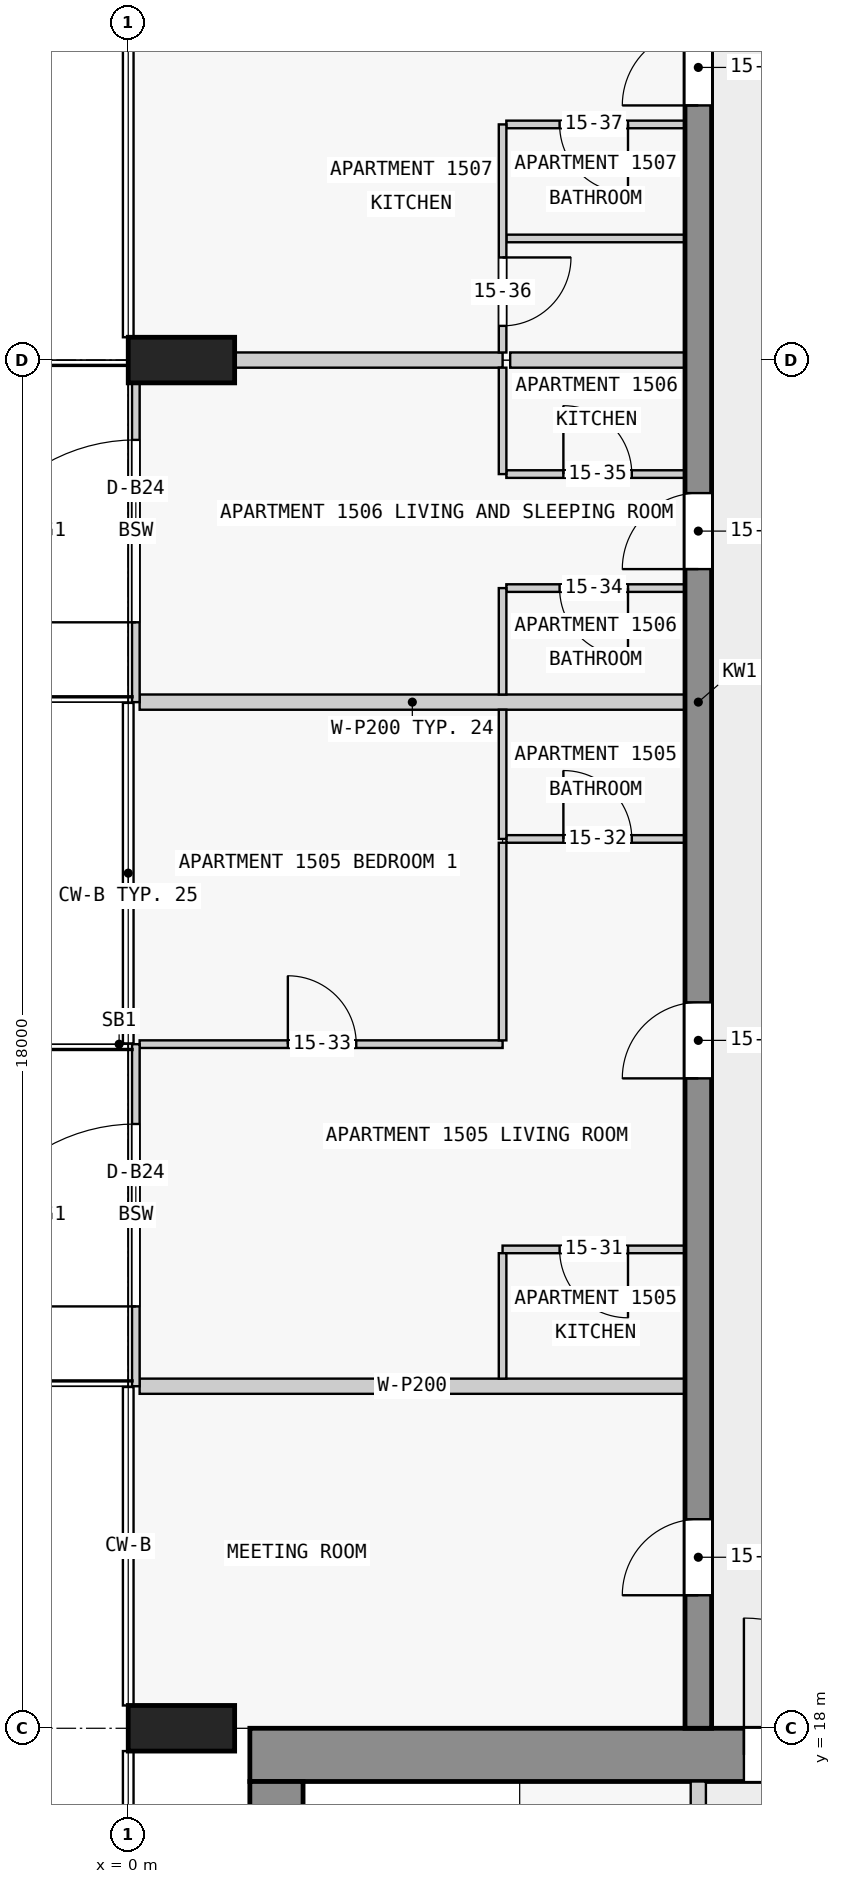
"""IFC4 building model, lengths in metres.
Left out: names, types, materials, properties, quantities, classifications, styles, units other than length and angle.
Written with IfcOpenShell. Run it as: python <this file> out.ifc"""

import sys

from ifc_helpers import new_model, si_unit, direction, frame, frame_2d, origin, origin_2d, place, context, subcontext, project, spatial, rectangle, extrude, element, fill, save


model = new_model("IFC4")
c1 = context("Model", 3, precision=1e-05, world=origin(), true_north=direction((0.0, 1.0)))
c2 = subcontext(c1, "Body", "Model", "MODEL_VIEW")
j1 = project(units=[si_unit("LENGTHUNIT", "METRE"), si_unit("PLANEANGLEUNIT", "RADIAN")], contexts=[c1])
p1 = place(None, origin())
s1 = spatial("IfcSite", under=j1, at=p1, CompositionType="ELEMENT")
p2 = place(p1, origin())
s2 = spatial("IfcBuilding", under=s1, at=p2, CompositionType="ELEMENT")
p3 = place(p2, frame((0.0, 0.0, 61.8)))
s3 = spatial("IfcBuildingStorey", under=s2, at=p3, CompositionType="ELEMENT", Elevation=61.8)
for number, where, z_axis, x_axis in (
    (1, (0.7, 36.0, 0.0), (0.0, 0.0, 1.0), (0.0, 1.0, 0.0)),
    (2, (0.7, 18.0, 0.0), (0.0, 0.0, 1.0), (0.0, 1.0, 0.0)),
):
    element("IfcColumn", number, at=place(p3, frame(where, z_axis=z_axis, x_axis=x_axis)), inside=s3, PredefinedType="COLUMN", context=c2, shape_type="SweptSolid", body=[
        extrude(rectangle(XDim=0.6, YDim=1.4, at=origin_2d()), origin(), (0.0, 0.0, 1.0), 3.5),
    ])
p4 = place(p3, frame((1.6, 17.65, 0.0), z_axis=(0.0, 0.0, 1.0), x_axis=(1.0, 0.0, 0.0)))
e3 = element("IfcWall", 3, at=p4, inside=s3, PredefinedType="SHEAR", context=c2, shape_type="SweptSolid", body=[
    extrude(rectangle(XDim=20.9, YDim=0.7, at=frame_2d((10.45, 0.0))), origin(), (0.0, 0.0, 1.0), 3.25),
])
p5 = place(p4, frame((6.5, 0.0, 0.0)))
e4 = element("IfcOpeningElement", 4, at=p5, cuts=e3, PredefinedType="OPENING", context=c2, shape_type="SweptSolid", body=[
    extrude(rectangle(XDim=1.8, YDim=2.1, at=frame_2d((0.9, 1.05))), frame((0.0, 0.36, 0.0), z_axis=(0.0, -1.0, 0.0), x_axis=(1.0, 0.0, 0.0)), (0.0, 0.0, 1.0), 0.72),
])
p6 = place(p3, frame((1.95, 2.5, 0.0), z_axis=(0.0, 0.0, 1.0), x_axis=(0.0, 1.0, 0.0)))
e5 = element("IfcWall", 5, at=p6, inside=s3, PredefinedType="SHEAR", context=c2, shape_type="SweptSolid", body=[
    extrude(rectangle(XDim=14.8, YDim=0.7, at=frame_2d((7.4, 0.0))), origin(), (0.0, 0.0, 1.0), 3.25),
])
p7 = place(p3, frame((7.5, 18.0, 0.0), z_axis=(0.0, 0.0, 1.0), x_axis=(0.0, 1.0, 0.0)))
e6 = element("IfcWall", 6, at=p7, inside=s3, PredefinedType="SHEAR", context=c2, shape_type="SweptSolid", body=[
    extrude(rectangle(XDim=27.0, YDim=0.35, at=frame_2d((13.5, 0.0))), origin(), (0.0, 0.0, 1.0), 3.25),
])
p8 = place(p7, frame((1.75, 0.0, 0.0)))
e7 = element("IfcOpeningElement", 7, at=p8, cuts=e6, PredefinedType="OPENING", context=c2, shape_type="SweptSolid", body=[
    extrude(rectangle(XDim=1.0, YDim=2.1, at=frame_2d((0.5, 1.05))), frame((0.0, 0.185, 0.0), z_axis=(0.0, -1.0, 0.0), x_axis=(1.0, 0.0, 0.0)), (0.0, 0.0, 1.0), 0.37),
])
p9 = place(p7, frame((8.55, 0.0, 0.0)))
e8 = element("IfcOpeningElement", 8, at=p9, cuts=e6, PredefinedType="OPENING", context=c2, shape_type="SweptSolid", body=[
    extrude(rectangle(XDim=1.0, YDim=2.1, at=frame_2d((0.5, 1.05))), frame((0.0, 0.185, 0.0), z_axis=(0.0, -1.0, 0.0), x_axis=(1.0, 0.0, 0.0)), (0.0, 0.0, 1.0), 0.37),
])
p10 = place(p7, frame((15.25, 0.0, 0.0)))
e9 = element("IfcOpeningElement", 9, at=p10, cuts=e6, PredefinedType="OPENING", context=c2, shape_type="SweptSolid", body=[
    extrude(rectangle(XDim=1.0, YDim=2.1, at=frame_2d((0.5, 1.05))), frame((0.0, 0.185, 0.0), z_axis=(0.0, -1.0, 0.0), x_axis=(1.0, 0.0, 0.0)), (0.0, 0.0, 1.0), 0.37),
])
p11 = place(p7, frame((21.35, 0.0, 0.0)))
e10 = element("IfcOpeningElement", 10, at=p11, cuts=e6, PredefinedType="OPENING", context=c2, shape_type="SweptSolid", body=[
    extrude(rectangle(XDim=1.0, YDim=2.1, at=frame_2d((0.5, 1.05))), frame((0.0, 0.185, 0.0), z_axis=(0.0, -1.0, 0.0), x_axis=(1.0, 0.0, 0.0)), (0.0, 0.0, 1.0), 0.37),
])
p12 = place(p3, frame((0.1, 22.5, 0.0), z_axis=(0.0, 0.0, 1.0), x_axis=(0.0, 1.0, 0.0)))
e11 = element("IfcWall", 11, at=p12, inside=s3, PredefinedType="STANDARD", context=c2, shape_type="SweptSolid", body=[
    extrude(rectangle(XDim=4.5, YDim=0.1, at=frame_2d((2.25, 0.0))), origin(), (0.0, 0.0, 1.0), 3.25),
])
p13 = place(p12, frame((1.05, 0.0, 0.0)))
e12 = element("IfcOpeningElement", 12, at=p13, cuts=e11, PredefinedType="OPENING", context=c2, shape_type="SweptSolid", body=[
    extrude(rectangle(XDim=2.4, YDim=2.4, at=frame_2d((1.2, 1.2))), frame((0.0, 0.06, 0.0), z_axis=(0.0, -1.0, 0.0), x_axis=(1.0, 0.0, 0.0)), (0.0, 0.0, 1.0), 0.12),
])
p14 = place(p3, frame((0.1, 31.5, 0.0), z_axis=(0.0, 0.0, 1.0), x_axis=(0.0, 1.0, 0.0)))
e13 = element("IfcWall", 13, at=p14, inside=s3, PredefinedType="STANDARD", context=c2, shape_type="SweptSolid", body=[
    extrude(rectangle(XDim=4.5, YDim=0.1, at=frame_2d((2.25, 0.0))), origin(), (0.0, 0.0, 1.0), 3.25),
])
p15 = place(p14, frame((1.05, 0.0, 0.0)))
e14 = element("IfcOpeningElement", 14, at=p15, cuts=e13, PredefinedType="OPENING", context=c2, shape_type="SweptSolid", body=[
    extrude(rectangle(XDim=2.4, YDim=2.4, at=frame_2d((1.2, 1.2))), frame((0.0, 0.06, 0.0), z_axis=(0.0, -1.0, 0.0), x_axis=(1.0, 0.0, 0.0)), (0.0, 0.0, 1.0), 0.12),
])
p16 = place(p3, frame((7.5, 10.1, 0.0), z_axis=(0.0, 0.0, 1.0), x_axis=(0.0, 1.0, 0.0)))
e15 = element("IfcWall", 15, at=p16, inside=s3, PredefinedType="PARTITIONING", context=c2, shape_type="SweptSolid", body=[
    extrude(rectangle(XDim=7.2, YDim=0.2, at=frame_2d((3.6, 0.0))), origin(), (0.0, 0.0, 1.0), 3.25),
])
p17 = place(p16, frame((0.8, 0.0, 0.0)))
e16 = element("IfcOpeningElement", 16, at=p17, cuts=e15, PredefinedType="OPENING", context=c2, shape_type="SweptSolid", body=[
    extrude(rectangle(XDim=0.9, YDim=2.1, at=frame_2d((0.45, 1.05))), frame((0.0, 0.11, 0.0), z_axis=(0.0, -1.0, 0.0), x_axis=(1.0, 0.0, 0.0)), (0.0, 0.0, 1.0), 0.22),
])
p18 = place(p16, frame((3.3, 0.0, 0.0)))
e17 = element("IfcOpeningElement", 17, at=p18, cuts=e15, PredefinedType="OPENING", context=c2, shape_type="SweptSolid", body=[
    extrude(rectangle(XDim=0.9, YDim=2.1, at=frame_2d((0.45, 1.05))), frame((0.0, 0.11, 0.0), z_axis=(0.0, -1.0, 0.0), x_axis=(1.0, 0.0, 0.0)), (0.0, 0.0, 1.0), 0.22),
])
p19 = place(p16, frame((5.25, 0.0, 0.0)))
e18 = element("IfcOpeningElement", 18, at=p19, cuts=e15, PredefinedType="OPENING", context=c2, shape_type="SweptSolid", body=[
    extrude(rectangle(XDim=0.9, YDim=2.1, at=frame_2d((0.45, 1.05))), frame((0.0, 0.11, 0.0), z_axis=(0.0, -1.0, 0.0), x_axis=(1.0, 0.0, 0.0)), (0.0, 0.0, 1.0), 0.22),
])
p20 = place(p3, frame((7.325, 22.5, 0.0), z_axis=(0.0, 0.0, 1.0), x_axis=(-1.0, 0.0, 0.0)))
e19 = element("IfcWall", 19, at=p20, inside=s3, PredefinedType="PARTITIONING", context=c2, shape_type="SweptSolid", body=[
    extrude(rectangle(XDim=7.175, YDim=0.2, at=frame_2d((3.587, 0.0))), origin(), (0.0, 0.0, 1.0), 3.25),
])
p21 = place(p3, frame((7.325, 24.3, 0.0), z_axis=(0.0, 0.0, 1.0), x_axis=(-1.0, 0.0, 0.0)))
e20 = element("IfcWall", 20, at=p21, inside=s3, PredefinedType="PARTITIONING", context=c2, shape_type="SweptSolid", body=[
    extrude(rectangle(XDim=2.4, YDim=0.1, at=frame_2d((1.2, 0.0))), origin(), (0.0, 0.0, 1.0), 3.25),
])
p22 = place(p21, frame((0.75, 0.0, 0.0)))
e21 = element("IfcOpeningElement", 21, at=p22, cuts=e20, PredefinedType="OPENING", context=c2, shape_type="SweptSolid", body=[
    extrude(rectangle(XDim=0.9, YDim=2.1, at=frame_2d((0.45, 1.05))), frame((0.0, 0.06, 0.0), z_axis=(0.0, -1.0, 0.0), x_axis=(1.0, 0.0, 0.0)), (0.0, 0.0, 1.0), 0.12),
])
p23 = place(p3, frame((0.15, 27.0, 0.0), z_axis=(0.0, 0.0, 1.0), x_axis=(1.0, 0.0, 0.0)))
e22 = element("IfcWall", 22, at=p23, inside=s3, PredefinedType="PARTITIONING", context=c2, shape_type="SweptSolid", body=[
    extrude(rectangle(XDim=4.775, YDim=0.1, at=frame_2d((2.388, 0.0))), origin(), (0.0, 0.0, 1.0), 3.25),
])
p24 = place(p23, frame((1.95, 0.0, 0.0)))
e23 = element("IfcOpeningElement", 23, at=p24, cuts=e22, PredefinedType="OPENING", context=c2, shape_type="SweptSolid", body=[
    extrude(rectangle(XDim=0.9, YDim=2.1, at=frame_2d((0.45, 1.05))), frame((0.0, 0.06, 0.0), z_axis=(0.0, -1.0, 0.0), x_axis=(1.0, 0.0, 0.0)), (0.0, 0.0, 1.0), 0.12),
])
p25 = place(p3, frame((4.975, 29.7, 0.0), z_axis=(0.0, 0.0, 1.0), x_axis=(1.0, 0.0, 0.0)))
e24 = element("IfcWall", 24, at=p25, inside=s3, PredefinedType="PARTITIONING", context=c2, shape_type="SweptSolid", body=[
    extrude(rectangle(XDim=2.35, YDim=0.1, at=frame_2d((1.175, 0.0))), origin(), (0.0, 0.0, 1.0), 3.25),
])
p26 = place(p25, frame((0.75, 0.0, 0.0)))
e25 = element("IfcOpeningElement", 25, at=p26, cuts=e24, PredefinedType="OPENING", context=c2, shape_type="SweptSolid", body=[
    extrude(rectangle(XDim=0.9, YDim=2.1, at=frame_2d((0.45, 1.05))), frame((0.0, 0.06, 0.0), z_axis=(0.0, -1.0, 0.0), x_axis=(1.0, 0.0, 0.0)), (0.0, 0.0, 1.0), 0.12),
])
p27 = place(p3, frame((7.325, 31.5, 0.0), z_axis=(0.0, 0.0, 1.0), x_axis=(-1.0, 0.0, 0.0)))
e26 = element("IfcWall", 26, at=p27, inside=s3, PredefinedType="PARTITIONING", context=c2, shape_type="SweptSolid", body=[
    extrude(rectangle(XDim=7.175, YDim=0.2, at=frame_2d((3.587, 0.0))), origin(), (0.0, 0.0, 1.0), 3.25),
])
p28 = place(p3, frame((7.325, 33.0, 0.0), z_axis=(0.0, 0.0, 1.0), x_axis=(-1.0, 0.0, 0.0)))
e27 = element("IfcWall", 27, at=p28, inside=s3, PredefinedType="PARTITIONING", context=c2, shape_type="SweptSolid", body=[
    extrude(rectangle(XDim=2.35, YDim=0.1, at=frame_2d((1.175, 0.0))), origin(), (0.0, 0.0, 1.0), 3.25),
])
p29 = place(p28, frame((0.75, 0.0, 0.0)))
e28 = element("IfcOpeningElement", 28, at=p29, cuts=e27, PredefinedType="OPENING", context=c2, shape_type="SweptSolid", body=[
    extrude(rectangle(XDim=0.9, YDim=2.1, at=frame_2d((0.45, 1.05))), frame((0.0, 0.06, 0.0), z_axis=(0.0, -1.0, 0.0), x_axis=(1.0, 0.0, 0.0)), (0.0, 0.0, 1.0), 0.12),
])
p30 = place(p3, frame((4.975, 34.5, 0.0), z_axis=(0.0, 0.0, 1.0), x_axis=(1.0, 0.0, 0.0)))
e29 = element("IfcWall", 29, at=p30, inside=s3, PredefinedType="PARTITIONING", context=c2, shape_type="SweptSolid", body=[
    extrude(rectangle(XDim=2.35, YDim=0.1, at=frame_2d((1.175, 0.0))), origin(), (0.0, 0.0, 1.0), 3.25),
])
p31 = place(p30, frame((0.75, 0.0, 0.0)))
e30 = element("IfcOpeningElement", 30, at=p31, cuts=e29, PredefinedType="OPENING", context=c2, shape_type="SweptSolid", body=[
    extrude(rectangle(XDim=0.9, YDim=2.1, at=frame_2d((0.45, 1.05))), frame((0.0, 0.06, 0.0), z_axis=(0.0, -1.0, 0.0), x_axis=(1.0, 0.0, 0.0)), (0.0, 0.0, 1.0), 0.12),
])
p32 = place(p3, frame((7.325, 36.0, 0.0), z_axis=(0.0, 0.0, 1.0), x_axis=(-1.0, 0.0, 0.0)))
e31 = element("IfcWall", 31, at=p32, inside=s3, PredefinedType="PARTITIONING", context=c2, shape_type="SweptSolid", body=[
    extrude(rectangle(XDim=2.3, YDim=0.2, at=frame_2d((1.15, 0.0))), origin(), (0.0, 0.0, 1.0), 3.25),
])
p33 = place(p3, frame((1.4, 36.0, 0.0), z_axis=(0.0, 0.0, 1.0), x_axis=(1.0, 0.0, 0.0)))
e32 = element("IfcWall", 32, at=p33, inside=s3, PredefinedType="PARTITIONING", context=c2, shape_type="SweptSolid", body=[
    extrude(rectangle(XDim=3.525, YDim=0.2, at=frame_2d((1.763, 0.0))), origin(), (0.0, 0.0, 1.0), 3.25),
])
p34 = place(p3, frame((7.325, 37.6, 0.0), z_axis=(0.0, 0.0, 1.0), x_axis=(-1.0, 0.0, 0.0)))
e33 = element("IfcWall", 33, at=p34, inside=s3, PredefinedType="PARTITIONING", context=c2, shape_type="SweptSolid", body=[
    extrude(rectangle(XDim=2.35, YDim=0.1, at=frame_2d((1.175, 0.0))), origin(), (0.0, 0.0, 1.0), 3.25),
])
p35 = place(p3, frame((7.325, 39.1, 0.0), z_axis=(0.0, 0.0, 1.0), x_axis=(-1.0, 0.0, 0.0)))
e34 = element("IfcWall", 34, at=p35, inside=s3, PredefinedType="PARTITIONING", context=c2, shape_type="SweptSolid", body=[
    extrude(rectangle(XDim=2.35, YDim=0.1, at=frame_2d((1.175, 0.0))), origin(), (0.0, 0.0, 1.0), 3.25),
])
p36 = place(p35, frame((0.75, 0.0, 0.0)))
e35 = element("IfcOpeningElement", 35, at=p36, cuts=e34, PredefinedType="OPENING", context=c2, shape_type="SweptSolid", body=[
    extrude(rectangle(XDim=0.9, YDim=2.1, at=frame_2d((0.45, 1.05))), frame((0.0, 0.06, 0.0), z_axis=(0.0, -1.0, 0.0), x_axis=(1.0, 0.0, 0.0)), (0.0, 0.0, 1.0), 0.12),
])
p37 = place(p3, frame((4.925, 24.25, 0.0), z_axis=(0.0, 0.0, 1.0), x_axis=(0.0, -1.0, 0.0)))
e36 = element("IfcWall", 36, at=p37, inside=s3, PredefinedType="PARTITIONING", context=c2, shape_type="SweptSolid", body=[
    extrude(rectangle(XDim=1.65, YDim=0.1, at=frame_2d((0.825, 0.0))), origin(), (0.0, 0.0, 1.0), 3.25),
])
p38 = place(p3, frame((4.925, 31.4, 0.0), z_axis=(0.0, 0.0, 1.0), x_axis=(0.0, -1.0, 0.0)))
e37 = element("IfcWall", 37, at=p38, inside=s3, PredefinedType="PARTITIONING", context=c2, shape_type="SweptSolid", body=[
    extrude(rectangle(XDim=1.7, YDim=0.1, at=frame_2d((0.85, 0.0))), origin(), (0.0, 0.0, 1.0), 3.25),
])
for number, where, z_axis, x_axis in (
    (38, (4.925, 33.0, 0.0), (0.0, 0.0, 1.0), (0.0, -1.0, 0.0)),
    (39, (4.925, 35.9, 0.0), (0.0, 0.0, 1.0), (0.0, -1.0, 0.0)),
):
    element("IfcWall", number, at=place(p3, frame(where, z_axis=z_axis, x_axis=x_axis)), inside=s3, PredefinedType="PARTITIONING", context=c2, shape_type="SweptSolid", body=[
        extrude(rectangle(XDim=1.4, YDim=0.1, at=frame_2d((0.7, 0.0))), origin(), (0.0, 0.0, 1.0), 3.25),
    ])
p39 = place(p3, frame((4.925, 39.1, 0.0), z_axis=(0.0, 0.0, 1.0), x_axis=(0.0, -1.0, 0.0)))
e40 = element("IfcWall", 40, at=p39, inside=s3, PredefinedType="PARTITIONING", context=c2, shape_type="SweptSolid", body=[
    extrude(rectangle(XDim=3.0, YDim=0.1, at=frame_2d((1.5, 0.0))), origin(), (0.0, 0.0, 1.0), 3.25),
])
p40 = place(p39, frame((1.75, 0.0, 0.0)))
e41 = element("IfcOpeningElement", 41, at=p40, cuts=e40, PredefinedType="OPENING", context=c2, shape_type="SweptSolid", body=[
    extrude(rectangle(XDim=0.9, YDim=2.1, at=frame_2d((0.45, 1.05))), frame((0.0, 0.06, 0.0), z_axis=(0.0, -1.0, 0.0), x_axis=(1.0, 0.0, 0.0)), (0.0, 0.0, 1.0), 0.12),
])
p41 = place(p3, frame((4.925, 27.05, 0.0), z_axis=(0.0, 0.0, 1.0), x_axis=(0.0, 1.0, 0.0)))
e42 = element("IfcWall", 42, at=p41, inside=s3, PredefinedType="PARTITIONING", context=c2, shape_type="SweptSolid", body=[
    extrude(rectangle(XDim=2.6, YDim=0.1, at=frame_2d((1.3, 0.0))), origin(), (0.0, 0.0, 1.0), 3.25),
])
p42 = place(p13, origin())
e43 = element("IfcDoor", 43, at=p42, inside=s3, OperationType="SINGLE_SWING_LEFT", PredefinedType="DOOR", context=c2, shape_type="SweptSolid", body=[
    extrude(rectangle(XDim=2.4, YDim=2.4, at=frame_2d((1.2, 1.2))), frame((0.0, 0.025, 0.0), z_axis=(0.0, -1.0, 0.0), x_axis=(1.0, 0.0, 0.0)), (0.0, 0.0, 1.0), 0.05),
])
fill(e12, e43)
p43 = place(p15, origin())
e44 = element("IfcDoor", 44, at=p43, inside=s3, OperationType="SINGLE_SWING_LEFT", PredefinedType="DOOR", context=c2, shape_type="SweptSolid", body=[
    extrude(rectangle(XDim=2.4, YDim=2.4, at=frame_2d((1.2, 1.2))), frame((0.0, 0.025, 0.0), z_axis=(0.0, -1.0, 0.0), x_axis=(1.0, 0.0, 0.0)), (0.0, 0.0, 1.0), 0.05),
])
fill(e14, e44)
p44 = place(p5, origin())
e45 = element("IfcDoor", 45, at=p44, inside=s3, OperationType="DOUBLE_DOOR_SINGLE_SWING", PredefinedType="DOOR", context=c2, shape_type="SweptSolid", body=[
    extrude(rectangle(XDim=1.8, YDim=2.1, at=frame_2d((0.9, 1.05))), frame((0.0, 0.025, 0.0), z_axis=(0.0, -1.0, 0.0), x_axis=(1.0, 0.0, 0.0)), (0.0, 0.0, 1.0), 0.05),
])
fill(e4, e45)
p45 = place(p8, origin())
e46 = element("IfcDoor", 46, at=p45, inside=s3, OperationType="SINGLE_SWING_LEFT", PredefinedType="DOOR", context=c2, shape_type="SweptSolid", body=[
    extrude(rectangle(XDim=1.0, YDim=2.1, at=frame_2d((0.5, 1.05))), frame((0.0, 0.025, 0.0), z_axis=(0.0, -1.0, 0.0), x_axis=(1.0, 0.0, 0.0)), (0.0, 0.0, 1.0), 0.05),
])
fill(e7, e46)
p46 = place(p9, origin())
e47 = element("IfcDoor", 47, at=p46, inside=s3, OperationType="SINGLE_SWING_LEFT", PredefinedType="DOOR", context=c2, shape_type="SweptSolid", body=[
    extrude(rectangle(XDim=1.0, YDim=2.1, at=frame_2d((0.5, 1.05))), frame((0.0, 0.025, 0.0), z_axis=(0.0, -1.0, 0.0), x_axis=(1.0, 0.0, 0.0)), (0.0, 0.0, 1.0), 0.05),
])
fill(e8, e47)
p47 = place(p10, origin())
e48 = element("IfcDoor", 48, at=p47, inside=s3, OperationType="SINGLE_SWING_RIGHT", PredefinedType="DOOR", context=c2, shape_type="SweptSolid", body=[
    extrude(rectangle(XDim=1.0, YDim=2.1, at=frame_2d((0.5, 1.05))), frame((0.0, 0.025, 0.0), z_axis=(0.0, -1.0, 0.0), x_axis=(1.0, 0.0, 0.0)), (0.0, 0.0, 1.0), 0.05),
])
fill(e9, e48)
p48 = place(p11, origin())
e49 = element("IfcDoor", 49, at=p48, inside=s3, OperationType="SINGLE_SWING_RIGHT", PredefinedType="DOOR", context=c2, shape_type="SweptSolid", body=[
    extrude(rectangle(XDim=1.0, YDim=2.1, at=frame_2d((0.5, 1.05))), frame((0.0, 0.025, 0.0), z_axis=(0.0, -1.0, 0.0), x_axis=(1.0, 0.0, 0.0)), (0.0, 0.0, 1.0), 0.05),
])
fill(e10, e49)
p49 = place(p22, origin())
e50 = element("IfcDoor", 50, at=p49, inside=s3, OperationType="SINGLE_SWING_LEFT", PredefinedType="DOOR", context=c2, shape_type="SweptSolid", body=[
    extrude(rectangle(XDim=0.9, YDim=2.1, at=frame_2d((0.45, 1.05))), frame((0.0, 0.025, 0.0), z_axis=(0.0, -1.0, 0.0), x_axis=(1.0, 0.0, 0.0)), (0.0, 0.0, 1.0), 0.05),
])
fill(e21, e50)
p50 = place(p26, origin())
e51 = element("IfcDoor", 51, at=p50, inside=s3, OperationType="SINGLE_SWING_RIGHT", PredefinedType="DOOR", context=c2, shape_type="SweptSolid", body=[
    extrude(rectangle(XDim=0.9, YDim=2.1, at=frame_2d((0.45, 1.05))), frame((0.0, 0.025, 0.0), z_axis=(0.0, -1.0, 0.0), x_axis=(1.0, 0.0, 0.0)), (0.0, 0.0, 1.0), 0.05),
])
fill(e25, e51)
p51 = place(p24, origin())
e52 = element("IfcDoor", 52, at=p51, inside=s3, OperationType="SINGLE_SWING_RIGHT", PredefinedType="DOOR", context=c2, shape_type="SweptSolid", body=[
    extrude(rectangle(XDim=0.9, YDim=2.1, at=frame_2d((0.45, 1.05))), frame((0.0, 0.025, 0.0), z_axis=(0.0, -1.0, 0.0), x_axis=(1.0, 0.0, 0.0)), (0.0, 0.0, 1.0), 0.05),
])
fill(e23, e52)
p52 = place(p29, origin())
e53 = element("IfcDoor", 53, at=p52, inside=s3, OperationType="SINGLE_SWING_RIGHT", PredefinedType="DOOR", context=c2, shape_type="SweptSolid", body=[
    extrude(rectangle(XDim=0.9, YDim=2.1, at=frame_2d((0.45, 1.05))), frame((0.0, 0.025, 0.0), z_axis=(0.0, -1.0, 0.0), x_axis=(1.0, 0.0, 0.0)), (0.0, 0.0, 1.0), 0.05),
])
fill(e28, e53)
p53 = place(p31, origin())
e54 = element("IfcDoor", 54, at=p53, inside=s3, OperationType="SINGLE_SWING_RIGHT", PredefinedType="DOOR", context=c2, shape_type="SweptSolid", body=[
    extrude(rectangle(XDim=0.9, YDim=2.1, at=frame_2d((0.45, 1.05))), frame((0.0, 0.025, 0.0), z_axis=(0.0, -1.0, 0.0), x_axis=(1.0, 0.0, 0.0)), (0.0, 0.0, 1.0), 0.05),
])
fill(e30, e54)
p54 = place(p40, origin())
e55 = element("IfcDoor", 55, at=p54, inside=s3, OperationType="SINGLE_SWING_RIGHT", PredefinedType="DOOR", context=c2, shape_type="SweptSolid", body=[
    extrude(rectangle(XDim=0.9, YDim=2.1, at=frame_2d((0.45, 1.05))), frame((0.0, 0.025, 0.0), z_axis=(0.0, -1.0, 0.0), x_axis=(1.0, 0.0, 0.0)), (0.0, 0.0, 1.0), 0.05),
])
fill(e41, e55)
p55 = place(p36, origin())
e56 = element("IfcDoor", 56, at=p55, inside=s3, OperationType="SINGLE_SWING_RIGHT", PredefinedType="DOOR", context=c2, shape_type="SweptSolid", body=[
    extrude(rectangle(XDim=0.9, YDim=2.1, at=frame_2d((0.45, 1.05))), frame((0.0, 0.025, 0.0), z_axis=(0.0, -1.0, 0.0), x_axis=(1.0, 0.0, 0.0)), (0.0, 0.0, 1.0), 0.05),
])
fill(e35, e56)
save(model, sys.argv[1])
